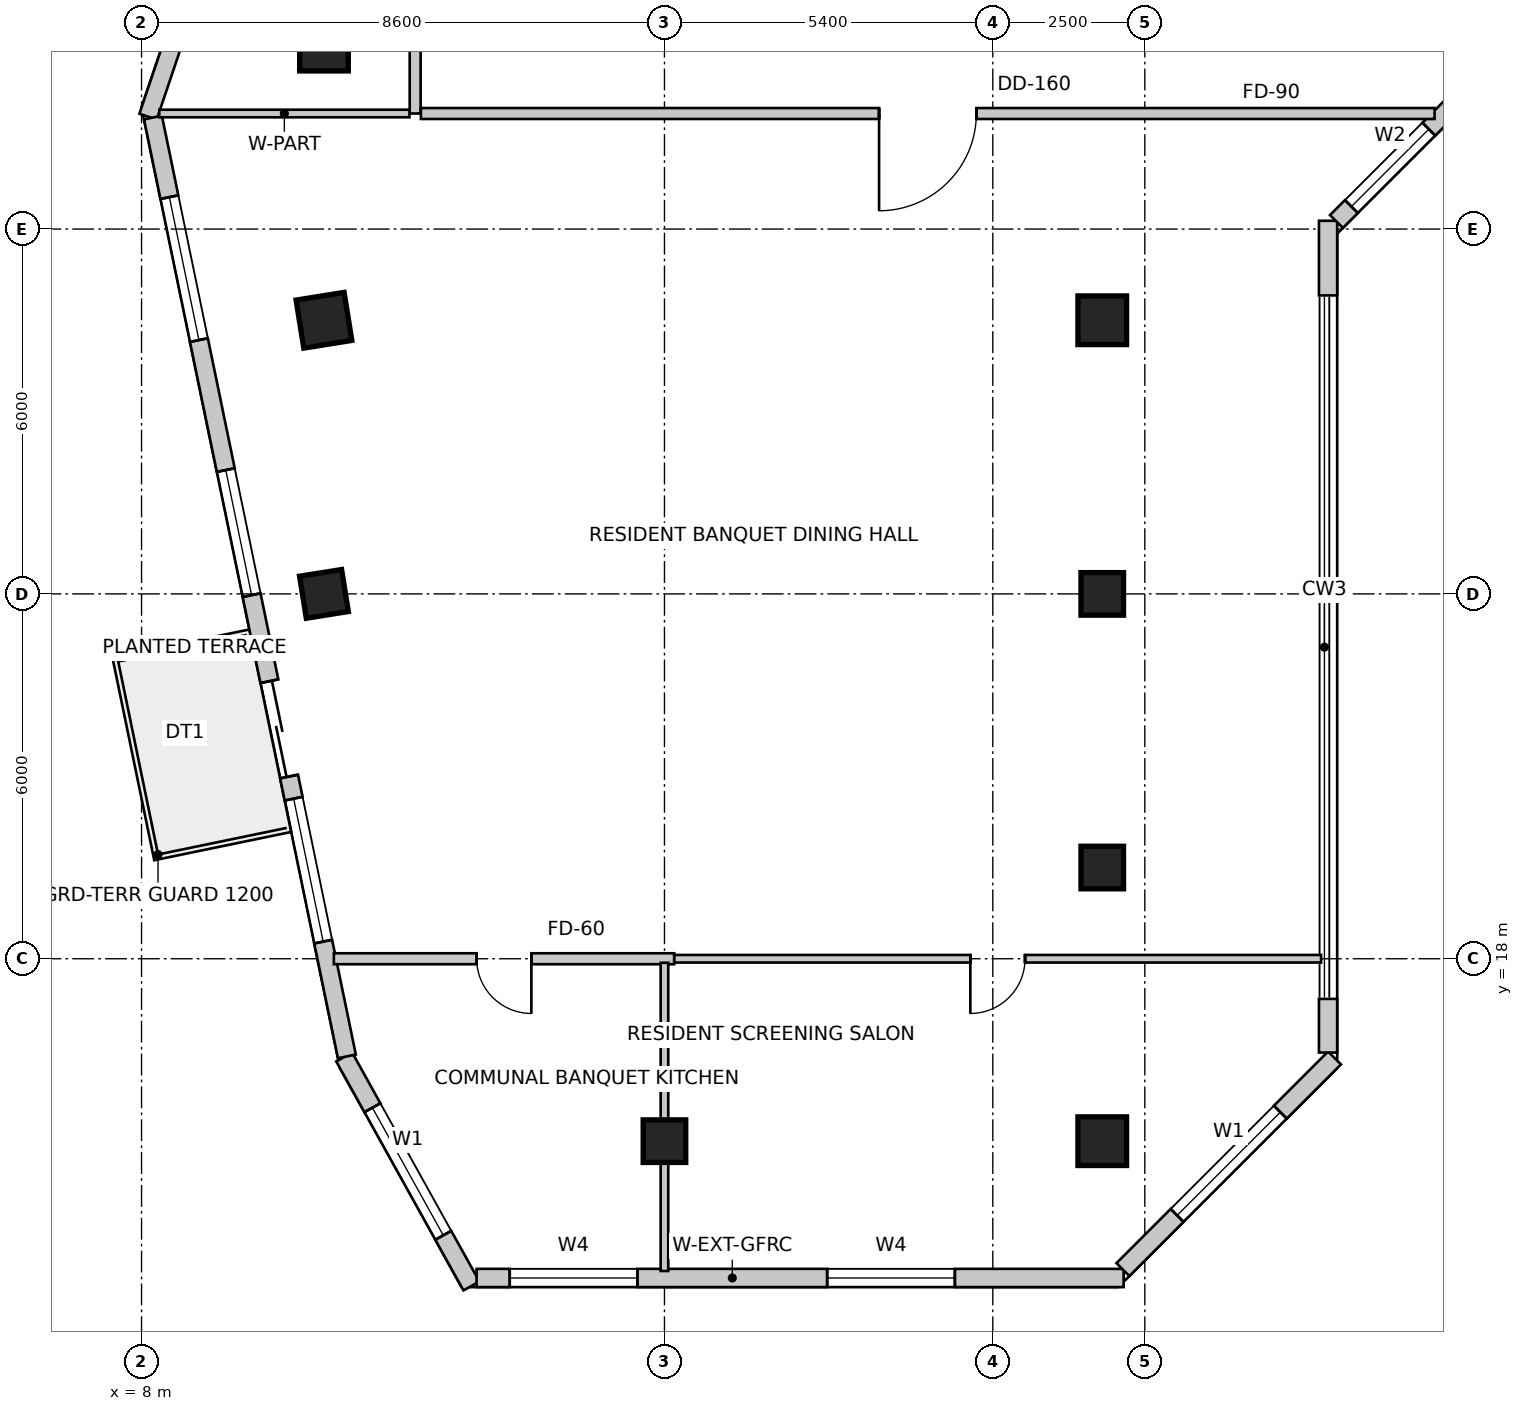
"""IFC4 building model, lengths in metres.
Left out: names, types, materials, properties, quantities, classifications, styles, units other than length and angle.
Written with IfcOpenShell. Run it as: python <this file> out.ifc"""

import sys

from ifc_helpers import new_model, si_unit, direction, frame, frame_2d, origin, origin_2d, place, context, subcontext, project, spatial, rectangle, extrude, source, transform, mapped, element, fill, save


model = new_model("IFC4")
c1 = context("Model", 3, precision=1e-05, world=origin(), true_north=direction((0.0, 1.0)))
c2 = subcontext(c1, "Body", "Model", "MODEL_VIEW")
j1 = project(units=[si_unit("LENGTHUNIT", "METRE"), si_unit("PLANEANGLEUNIT", "RADIAN")], contexts=[c1])
p1 = place(None, origin())
s1 = spatial("IfcSite", under=j1, at=p1, CompositionType="ELEMENT")
p2 = place(p1, origin())
s2 = spatial("IfcBuilding", under=s1, at=p2, CompositionType="ELEMENT")
p3 = place(p2, frame((0.0, 0.0, 204.4)))
s3 = spatial("IfcBuildingStorey", under=s2, at=p3, CompositionType="ELEMENT", Elevation=204.4)
m1 = source(origin(), c2, "Body", "SweptSolid", [
    extrude(rectangle(XDim=0.8, YDim=0.8, at=origin_2d()), origin(), (0.0, 0.0, 1.0), 3.5),
])
for number, where, z_axis, x_axis in (
    (1, (11.0, 33.0, 0.0), (0.0, 0.0, 1.0), (1.0, 0.0, 0.0)),
    (2, (11.0, 28.5, 0.0), (0.0, 0.0, 1.0), (0.158, -0.987, 0.0)),
):
    element("IfcColumn", number, at=place(p3, frame(where, z_axis=z_axis, x_axis=x_axis)), inside=s3, PredefinedType="COLUMN", context=c2, shape_type="MappedRepresentation", body=[
        mapped(m1, transform((0.0, 0.0, 0.0), scale=1.0)),
    ])
m2 = source(origin(), c2, "Body", "SweptSolid", [
    extrude(rectangle(XDim=0.7, YDim=0.7, at=origin_2d()), origin(), (0.0, 0.0, 1.0), 3.5),
])
p4 = place(p3, frame((11.0, 24.0, 0.0), z_axis=(0.0, 0.0, 1.0), x_axis=(0.158158067254, -0.987413806751, 0.0)))
e3 = element("IfcColumn", 3, at=p4, inside=s3, PredefinedType="COLUMN", context=c2, shape_type="MappedRepresentation", body=[
    mapped(m2, transform((0.0, 0.0, 0.0), scale=1.0)),
])
p5 = place(p3, frame((23.8, 28.5, 0.0), z_axis=(0.0, 0.0, 1.0), x_axis=(1.0, 0.0, 0.0)))
e4 = element("IfcColumn", 4, at=p5, inside=s3, PredefinedType="COLUMN", context=c2, shape_type="MappedRepresentation", body=[
    mapped(m1, transform((0.0, 0.0, 0.0), scale=1.0)),
])
for number, where, z_axis, x_axis in (
    (5, (23.8, 24.0, 0.0), (0.0, 0.0, 1.0), (1.0, 0.0, 0.0)),
    (6, (23.8, 19.5, 0.0), (0.0, 0.0, 1.0), (1.0, 0.0, 0.0)),
):
    element("IfcColumn", number, at=place(p3, frame(where, z_axis=z_axis, x_axis=x_axis)), inside=s3, PredefinedType="COLUMN", context=c2, shape_type="MappedRepresentation", body=[
        mapped(m2, transform((0.0, 0.0, 0.0), scale=1.0)),
    ])
p6 = place(p3, frame((23.8, 15.0, 0.0), z_axis=(0.0, 0.0, 1.0), x_axis=(1.0, 0.0, 0.0)))
e7 = element("IfcColumn", 7, at=p6, inside=s3, PredefinedType="COLUMN", context=c2, shape_type="MappedRepresentation", body=[
    mapped(m1, transform((0.0, 0.0, 0.0), scale=1.0)),
])
p7 = place(p3, frame((16.6, 15.0, 0.0), z_axis=(0.0, 0.0, 1.0), x_axis=(1.0, 0.0, 0.0)))
e8 = element("IfcColumn", 8, at=p7, inside=s3, PredefinedType="COLUMN", context=c2, shape_type="MappedRepresentation", body=[
    mapped(m2, transform((0.0, 0.0, 0.0), scale=1.0)),
])
p8 = place(p3, frame((11.333, 16.384, 0.0), z_axis=(0.0, 0.0, 1.0), x_axis=(0.485633305139, -0.874162623852, 0.0)))
e9 = element("IfcWall", 9, at=p8, inside=s3, PredefinedType="SOLIDWALL", context=c2, shape_type="SweptSolid", body=[
    extrude(rectangle(XDim=4.307, YDim=0.3, at=frame_2d((2.153, 0.0))), origin(), (0.0, 0.0, 1.0), 3.25),
])
m3 = source(origin(), c2, "Body", "SweptSolid", [
    extrude(rectangle(XDim=2.4, YDim=2.2, at=frame_2d((1.2, 1.1))), frame((0.0, 0.16, 0.0), z_axis=(0.0, -1.0, 0.0), x_axis=(1.0, 0.0, 0.0)), (0.0, 0.0, 1.0), 0.32),
])
p9 = place(p8, frame((0.954, 0.0, 0.85)))
e10 = element("IfcOpeningElement", 10, at=p9, cuts=e9, PredefinedType="OPENING", context=c2, shape_type="MappedRepresentation", body=[
    mapped(m3, transform((0.0, 0.0, 0.0), scale=1.0)),
])
p10 = place(p3, frame((13.51, 12.75, 0.0), z_axis=(0.0, 0.0, 1.0), x_axis=(1.0, 0.0, 0.0)))
e11 = element("IfcWall", 11, at=p10, inside=s3, PredefinedType="SOLIDWALL", context=c2, shape_type="SweptSolid", body=[
    extrude(rectangle(XDim=10.642, YDim=0.3, at=frame_2d((5.321, 0.0))), origin(), (0.0, 0.0, 1.0), 3.25),
])
m4 = source(origin(), c2, "Body", "SweptSolid", [
    extrude(rectangle(XDim=2.1, YDim=2.0, at=frame_2d((1.05, 1.0))), frame((0.0, 0.16, 0.0), z_axis=(0.0, -1.0, 0.0), x_axis=(1.0, 0.0, 0.0)), (0.0, 0.0, 1.0), 0.32),
])
p11 = place(p10, frame((0.545, 0.0, 0.85)))
e12 = element("IfcOpeningElement", 12, at=p11, cuts=e11, PredefinedType="OPENING", context=c2, shape_type="MappedRepresentation", body=[
    mapped(m4, transform((0.0, 0.0, 0.0), scale=1.0)),
])
p12 = place(p10, frame((5.766, 0.0, 0.85)))
e13 = element("IfcOpeningElement", 13, at=p12, cuts=e11, PredefinedType="OPENING", context=c2, shape_type="MappedRepresentation", body=[
    mapped(m4, transform((0.0, 0.0, 0.0), scale=1.0)),
])
p13 = place(p3, frame((24.14, 12.888, 0.0), z_axis=(0.0, 0.0, 1.0), x_axis=(0.707106781187, 0.707106781187, 0.0)))
e14 = element("IfcWall", 14, at=p13, inside=s3, PredefinedType="SOLIDWALL", context=c2, shape_type="SweptSolid", body=[
    extrude(rectangle(XDim=4.922, YDim=0.3, at=frame_2d((2.461, 0.0))), origin(), (0.0, 0.0, 1.0), 3.25),
])
p14 = place(p13, frame((1.261, 0.0, 0.85)))
e15 = element("IfcOpeningElement", 15, at=p14, cuts=e14, PredefinedType="OPENING", context=c2, shape_type="MappedRepresentation", body=[
    mapped(m3, transform((0.0, 0.0, 0.0), scale=1.0)),
])
p15 = place(p3, frame((27.514, 16.457, 0.0), z_axis=(0.0, 0.0, 1.0), x_axis=(0.0, 1.0, 0.0)))
e16 = element("IfcWall", 16, at=p15, inside=s3, PredefinedType="SOLIDWALL", context=c2, shape_type="SweptSolid", body=[
    extrude(rectangle(XDim=0.882, YDim=0.3, at=frame_2d((0.441, 0.0))), origin(), (0.0, 0.0, 1.0), 3.25),
])
p16 = place(p3, frame((27.514, 28.909, 0.0), z_axis=(0.0, 0.0, 1.0), x_axis=(0.0, 1.0, 0.0)))
e17 = element("IfcWall", 17, at=p16, inside=s3, PredefinedType="SOLIDWALL", context=c2, shape_type="SweptSolid", body=[
    extrude(rectangle(XDim=1.227, YDim=0.3, at=frame_2d((0.614, 0.0))), origin(), (0.0, 0.0, 1.0), 3.25),
])
p17 = place(p3, frame((27.652, 30.124, 0.0), z_axis=(0.0, 0.0, 1.0), x_axis=(0.707064797706, 0.707148762175, 0.0)))
e18 = element("IfcWall", 18, at=p17, inside=s3, PredefinedType="SOLIDWALL", context=c2, shape_type="SweptSolid", body=[
    extrude(rectangle(XDim=2.908, YDim=0.3, at=frame_2d((1.454, 0.0))), origin(), (0.0, 0.0, 1.0), 3.25),
])
m5 = source(origin(), c2, "Body", "SweptSolid", [
    extrude(rectangle(XDim=1.8, YDim=2.1, at=frame_2d((0.9, 1.05))), frame((0.0, 0.16, 0.0), z_axis=(0.0, -1.0, 0.0), x_axis=(1.0, 0.0, 0.0)), (0.0, 0.0, 1.0), 0.32),
])
p18 = place(p17, frame((0.348, 0.0, 0.85)))
e19 = element("IfcOpeningElement", 19, at=p18, cuts=e18, PredefinedType="OPENING", context=c2, shape_type="MappedRepresentation", body=[
    mapped(m5, transform((0.0, 0.0, 0.0), scale=1.0)),
])
p19 = place(p3, frame((13.269, 47.134, 0.0), z_axis=(0.0, 0.0, 1.0), x_axis=(-0.319920776449, -0.947444297464, 0.0)))
e20 = element("IfcWall", 20, at=p19, inside=s3, PredefinedType="SOLIDWALL", context=c2, shape_type="SweptSolid", body=[
    extrude(rectangle(XDim=16.133, YDim=0.3, at=frame_2d((8.067, 0.0))), origin(), (0.0, 0.0, 1.0), 3.25),
])
p20 = place(p19, frame((2.513, 0.0, 0.85)))
e21 = element("IfcOpeningElement", 21, at=p20, cuts=e20, PredefinedType="OPENING", context=c2, shape_type="MappedRepresentation", body=[
    mapped(m4, transform((0.0, 0.0, 0.0), scale=1.0)),
])
p21 = place(p19, frame((7.26, 0.0, 0.85)))
e22 = element("IfcOpeningElement", 22, at=p21, cuts=e20, PredefinedType="OPENING", context=c2, shape_type="MappedRepresentation", body=[
    mapped(m3, transform((0.0, 0.0, 0.0), scale=1.0)),
])
p22 = place(p19, frame((12.307, 0.0, 0.85)))
e23 = element("IfcOpeningElement", 23, at=p22, cuts=e20, PredefinedType="OPENING", context=c2, shape_type="MappedRepresentation", body=[
    mapped(m4, transform((0.0, 0.0, 0.0), scale=1.0)),
])
p23 = place(p3, frame((8.188, 31.834, 0.0), z_axis=(0.0, 0.0, 1.0), x_axis=(0.202303475707, -0.979322880217, 0.0)))
e24 = element("IfcWall", 24, at=p23, inside=s3, PredefinedType="SOLIDWALL", context=c2, shape_type="SweptSolid", body=[
    extrude(rectangle(XDim=15.766, YDim=0.3, at=frame_2d((7.883, 0.0))), origin(), (0.0, 0.0, 1.0), 3.25),
])
m6 = source(origin(), c2, "Body", "SweptSolid", [
    extrude(rectangle(XDim=1.6, YDim=2.15, at=frame_2d((0.8, 1.075))), frame((0.0, 0.16, 0.0), z_axis=(0.0, -1.0, 0.0), x_axis=(1.0, 0.0, 0.0)), (0.0, 0.0, 1.0), 0.32),
])
p24 = place(p23, frame((9.466, 0.0, 0.0)))
e25 = element("IfcOpeningElement", 25, at=p24, cuts=e24, PredefinedType="OPENING", context=c2, shape_type="MappedRepresentation", body=[
    mapped(m6, transform((0.0, 0.0, 0.0), scale=1.0)),
])
p25 = place(p23, frame((1.337, 0.0, 0.85)))
e26 = element("IfcOpeningElement", 26, at=p25, cuts=e24, PredefinedType="OPENING", context=c2, shape_type="MappedRepresentation", body=[
    mapped(m3, transform((0.0, 0.0, 0.0), scale=1.0)),
])
p26 = place(p23, frame((5.92, 0.0, 0.85)))
e27 = element("IfcOpeningElement", 27, at=p26, cuts=e24, PredefinedType="OPENING", context=c2, shape_type="MappedRepresentation", body=[
    mapped(m4, transform((0.0, 0.0, 0.0), scale=1.0)),
])
p27 = place(p23, frame((11.438, 0.0, 0.85)))
e28 = element("IfcOpeningElement", 28, at=p27, cuts=e24, PredefinedType="OPENING", context=c2, shape_type="MappedRepresentation", body=[
    mapped(m3, transform((0.0, 0.0, 0.0), scale=1.0)),
])
p28 = place(p3, frame((12.5, 31.9, 0.0), z_axis=(0.0, 0.0, 1.0), x_axis=(0.0, 1.0, 0.0)))
e29 = element("IfcWall", 29, at=p28, inside=s3, PredefinedType="PARTITIONING", context=c2, shape_type="SweptSolid", body=[
    extrude(rectangle(XDim=1.556, YDim=0.18, at=frame_2d((0.778, 0.0))), origin(), (0.0, 0.0, 1.0), 2.835),
])
p29 = place(p3, frame((29.265, 31.9, 0.0), z_axis=(0.0, 0.0, 1.0), x_axis=(-1.0, 0.0, 0.0)))
e30 = element("IfcWall", 30, at=p29, inside=s3, PredefinedType="PARTITIONING", context=c2, shape_type="SweptSolid", body=[
    extrude(rectangle(XDim=16.671, YDim=0.18, at=frame_2d((8.335, 0.0))), origin(), (0.0, 0.0, 1.0), 2.835),
])
m7 = source(origin(), c2, "Body", "SweptSolid", [
    extrude(rectangle(XDim=1.6, YDim=2.15, at=frame_2d((0.8, 1.075))), frame((0.0, 0.1, 0.0), z_axis=(0.0, -1.0, 0.0), x_axis=(1.0, 0.0, 0.0)), (0.0, 0.0, 1.0), 0.2),
])
p30 = place(p29, frame((7.536, 0.0, 0.0)))
e31 = element("IfcOpeningElement", 31, at=p30, cuts=e30, PredefinedType="OPENING", context=c2, shape_type="MappedRepresentation", body=[
    mapped(m7, transform((0.0, 0.0, 0.0), scale=1.0)),
])
p31 = place(p3, frame((12.406, 31.9, 0.0), z_axis=(0.0, 0.0, 1.0), x_axis=(-1.0, 0.0, 0.0)))
e32 = element("IfcWall", 32, at=p31, inside=s3, PredefinedType="PARTITIONING", context=c2, shape_type="SweptSolid", body=[
    extrude(rectangle(XDim=4.115, YDim=0.125, at=frame_2d((2.057, 0.0))), origin(), (0.0, 0.0, 1.0), 2.542),
])
p32 = place(p3, frame((16.76, 18.0, 0.0), z_axis=(0.0, 0.0, 1.0), x_axis=(-1.0, 0.0, 0.0)))
e33 = element("IfcWall", 33, at=p32, inside=s3, PredefinedType="PARTITIONING", context=c2, shape_type="SweptSolid", body=[
    extrude(rectangle(XDim=5.597, YDim=0.18, at=frame_2d((2.799, 0.0))), origin(), (0.0, 0.0, 1.0), 3.25),
])
m8 = source(origin(), c2, "Body", "SweptSolid", [
    extrude(rectangle(XDim=0.9, YDim=2.15, at=frame_2d((0.45, 1.075))), frame((0.0, 0.1, 0.0), z_axis=(0.0, -1.0, 0.0), x_axis=(1.0, 0.0, 0.0)), (0.0, 0.0, 1.0), 0.2),
])
p33 = place(p32, frame((2.349, 0.0, 0.0)))
e34 = element("IfcOpeningElement", 34, at=p33, cuts=e33, PredefinedType="OPENING", context=c2, shape_type="MappedRepresentation", body=[
    mapped(m8, transform((0.0, 0.0, 0.0), scale=1.0)),
])
p34 = place(p3, frame((27.399, 18.0, 0.0), z_axis=(0.0, 0.0, 1.0), x_axis=(-1.0, 0.0, 0.0)))
e35 = element("IfcWall", 35, at=p34, inside=s3, PredefinedType="PARTITIONING", context=c2, shape_type="SweptSolid", body=[
    extrude(rectangle(XDim=10.637, YDim=0.125, at=frame_2d((5.318, 0.0))), origin(), (0.0, 0.0, 1.0), 2.542),
])
m9 = source(origin(), c2, "Body", "SweptSolid", [
    extrude(rectangle(XDim=0.9, YDim=2.15, at=frame_2d((0.45, 1.075))), frame((0.0, 0.073, 0.0), z_axis=(0.0, -1.0, 0.0), x_axis=(1.0, 0.0, 0.0)), (0.0, 0.0, 1.0), 0.145),
])
p35 = place(p34, frame((4.868, 0.0, 0.0)))
e36 = element("IfcOpeningElement", 36, at=p35, cuts=e35, PredefinedType="OPENING", context=c2, shape_type="MappedRepresentation", body=[
    mapped(m9, transform((0.0, 0.0, 0.0), scale=1.0)),
])
p36 = place(p3, frame((16.6, 17.934, 0.0), z_axis=(0.0, 0.0, 1.0), x_axis=(0.0, -1.0, 0.0)))
e37 = element("IfcWall", 37, at=p36, inside=s3, PredefinedType="PARTITIONING", context=c2, shape_type="SweptSolid", body=[
    extrude(rectangle(XDim=5.069, YDim=0.125, at=frame_2d((2.534, 0.0))), origin(), (0.0, 0.0, 1.0), 2.542),
])
m10 = source(origin(), c2, "Body", "SweptSolid", [
    extrude(rectangle(XDim=2.4, YDim=2.2, at=frame_2d((1.2, 1.1))), frame((0.0, -0.015, 0.0), z_axis=(0.0, -1.0, 0.0), x_axis=(1.0, 0.0, 0.0)), (0.0, 0.0, 1.0), 0.06),
])
p37 = place(p9, origin())
e38 = element("IfcWindow", 38, at=p37, inside=s3, PartitioningType="SINGLE_PANEL", PredefinedType="WINDOW", context=c2, shape_type="MappedRepresentation", body=[
    mapped(m10, transform((0.0, 0.0, 0.0), scale=1.0)),
])
fill(e10, e38)
m11 = source(origin(), c2, "Body", "SweptSolid", [
    extrude(rectangle(XDim=2.1, YDim=2.0, at=frame_2d((1.05, 1.0))), frame((0.0, -0.015, 0.0), z_axis=(0.0, -1.0, 0.0), x_axis=(1.0, 0.0, 0.0)), (0.0, 0.0, 1.0), 0.06),
])
p38 = place(p11, origin())
e39 = element("IfcWindow", 39, at=p38, inside=s3, PartitioningType="SINGLE_PANEL", PredefinedType="WINDOW", context=c2, shape_type="MappedRepresentation", body=[
    mapped(m11, transform((0.0, 0.0, 0.0), scale=1.0)),
])
fill(e12, e39)
p39 = place(p12, origin())
e40 = element("IfcWindow", 40, at=p39, inside=s3, PartitioningType="SINGLE_PANEL", PredefinedType="WINDOW", context=c2, shape_type="MappedRepresentation", body=[
    mapped(m11, transform((0.0, 0.0, 0.0), scale=1.0)),
])
fill(e13, e40)
p40 = place(p14, origin())
e41 = element("IfcWindow", 41, at=p40, inside=s3, PartitioningType="SINGLE_PANEL", PredefinedType="WINDOW", context=c2, shape_type="MappedRepresentation", body=[
    mapped(m10, transform((0.0, 0.0, 0.0), scale=1.0)),
])
fill(e15, e41)
m12 = source(origin(), c2, "Body", "SweptSolid", [
    extrude(rectangle(XDim=1.8, YDim=2.1, at=frame_2d((0.9, 1.05))), frame((0.0, -0.015, 0.0), z_axis=(0.0, -1.0, 0.0), x_axis=(1.0, 0.0, 0.0)), (0.0, 0.0, 1.0), 0.06),
])
p41 = place(p18, origin())
e42 = element("IfcWindow", 42, at=p41, inside=s3, PartitioningType="SINGLE_PANEL", PredefinedType="WINDOW", context=c2, shape_type="MappedRepresentation", body=[
    mapped(m12, transform((0.0, 0.0, 0.0), scale=1.0)),
])
fill(e19, e42)
m13 = source(origin(), c2, "Body", "SweptSolid", [
    extrude(rectangle(XDim=1.6, YDim=2.15, at=frame_2d((0.8, 1.075))), frame((0.0, 0.025, 0.0), z_axis=(0.0, -1.0, 0.0), x_axis=(1.0, 0.0, 0.0)), (0.0, 0.0, 1.0), 0.05),
])
p42 = place(p24, origin())
e43 = element("IfcDoor", 43, at=p42, inside=s3, OperationType="DOUBLE_DOOR_SLIDING", PredefinedType="DOOR", context=c2, shape_type="MappedRepresentation", body=[
    mapped(m13, transform((0.0, 0.0, 0.0), scale=1.0)),
])
fill(e25, e43)
p43 = place(p25, origin())
e44 = element("IfcWindow", 44, at=p43, inside=s3, PartitioningType="SINGLE_PANEL", PredefinedType="WINDOW", context=c2, shape_type="MappedRepresentation", body=[
    mapped(m10, transform((0.0, 0.0, 0.0), scale=1.0)),
])
fill(e26, e44)
p44 = place(p26, origin())
e45 = element("IfcWindow", 45, at=p44, inside=s3, PartitioningType="SINGLE_PANEL", PredefinedType="WINDOW", context=c2, shape_type="MappedRepresentation", body=[
    mapped(m11, transform((0.0, 0.0, 0.0), scale=1.0)),
])
fill(e27, e45)
p45 = place(p27, origin())
e46 = element("IfcWindow", 46, at=p45, inside=s3, PartitioningType="SINGLE_PANEL", PredefinedType="WINDOW", context=c2, shape_type="MappedRepresentation", body=[
    mapped(m10, transform((0.0, 0.0, 0.0), scale=1.0)),
])
fill(e28, e46)
m14 = source(origin(), c2, "Body", "SweptSolid", [
    extrude(rectangle(XDim=1.6, YDim=2.15, at=frame_2d((0.8, 1.075))), frame((0.0, 0.025, 0.0), z_axis=(0.0, -1.0, 0.0), x_axis=(1.0, 0.0, 0.0)), (0.0, 0.0, 1.0), 0.05),
])
p46 = place(p30, origin())
e47 = element("IfcDoor", 47, at=p46, inside=s3, OperationType="SINGLE_SWING_RIGHT", PredefinedType="DOOR", context=c2, shape_type="MappedRepresentation", body=[
    mapped(m14, transform((0.0, 0.0, 0.0), scale=1.0)),
])
fill(e31, e47)
m15 = source(origin(), c2, "Body", "SweptSolid", [
    extrude(rectangle(XDim=0.9, YDim=2.15, at=frame_2d((0.45, 1.075))), frame((0.0, 0.025, 0.0), z_axis=(0.0, -1.0, 0.0), x_axis=(1.0, 0.0, 0.0)), (0.0, 0.0, 1.0), 0.05),
])
p47 = place(p33, origin())
e48 = element("IfcDoor", 48, at=p47, inside=s3, OperationType="SINGLE_SWING_LEFT", PredefinedType="DOOR", context=c2, shape_type="MappedRepresentation", body=[
    mapped(m15, transform((0.0, 0.0, 0.0), scale=1.0)),
])
fill(e34, e48)
m16 = source(origin(), c2, "Body", "SweptSolid", [
    extrude(rectangle(XDim=0.9, YDim=2.15, at=frame_2d((0.45, 1.075))), frame((0.0, 0.025, 0.0), z_axis=(0.0, -1.0, 0.0), x_axis=(1.0, 0.0, 0.0)), (0.0, 0.0, 1.0), 0.05),
])
p48 = place(p35, origin())
e49 = element("IfcDoor", 49, at=p48, inside=s3, OperationType="SINGLE_SWING_RIGHT", PredefinedType="DOOR", context=c2, shape_type="MappedRepresentation", body=[
    mapped(m16, transform((0.0, 0.0, 0.0), scale=1.0)),
])
fill(e36, e49)
save(model, sys.argv[1])
